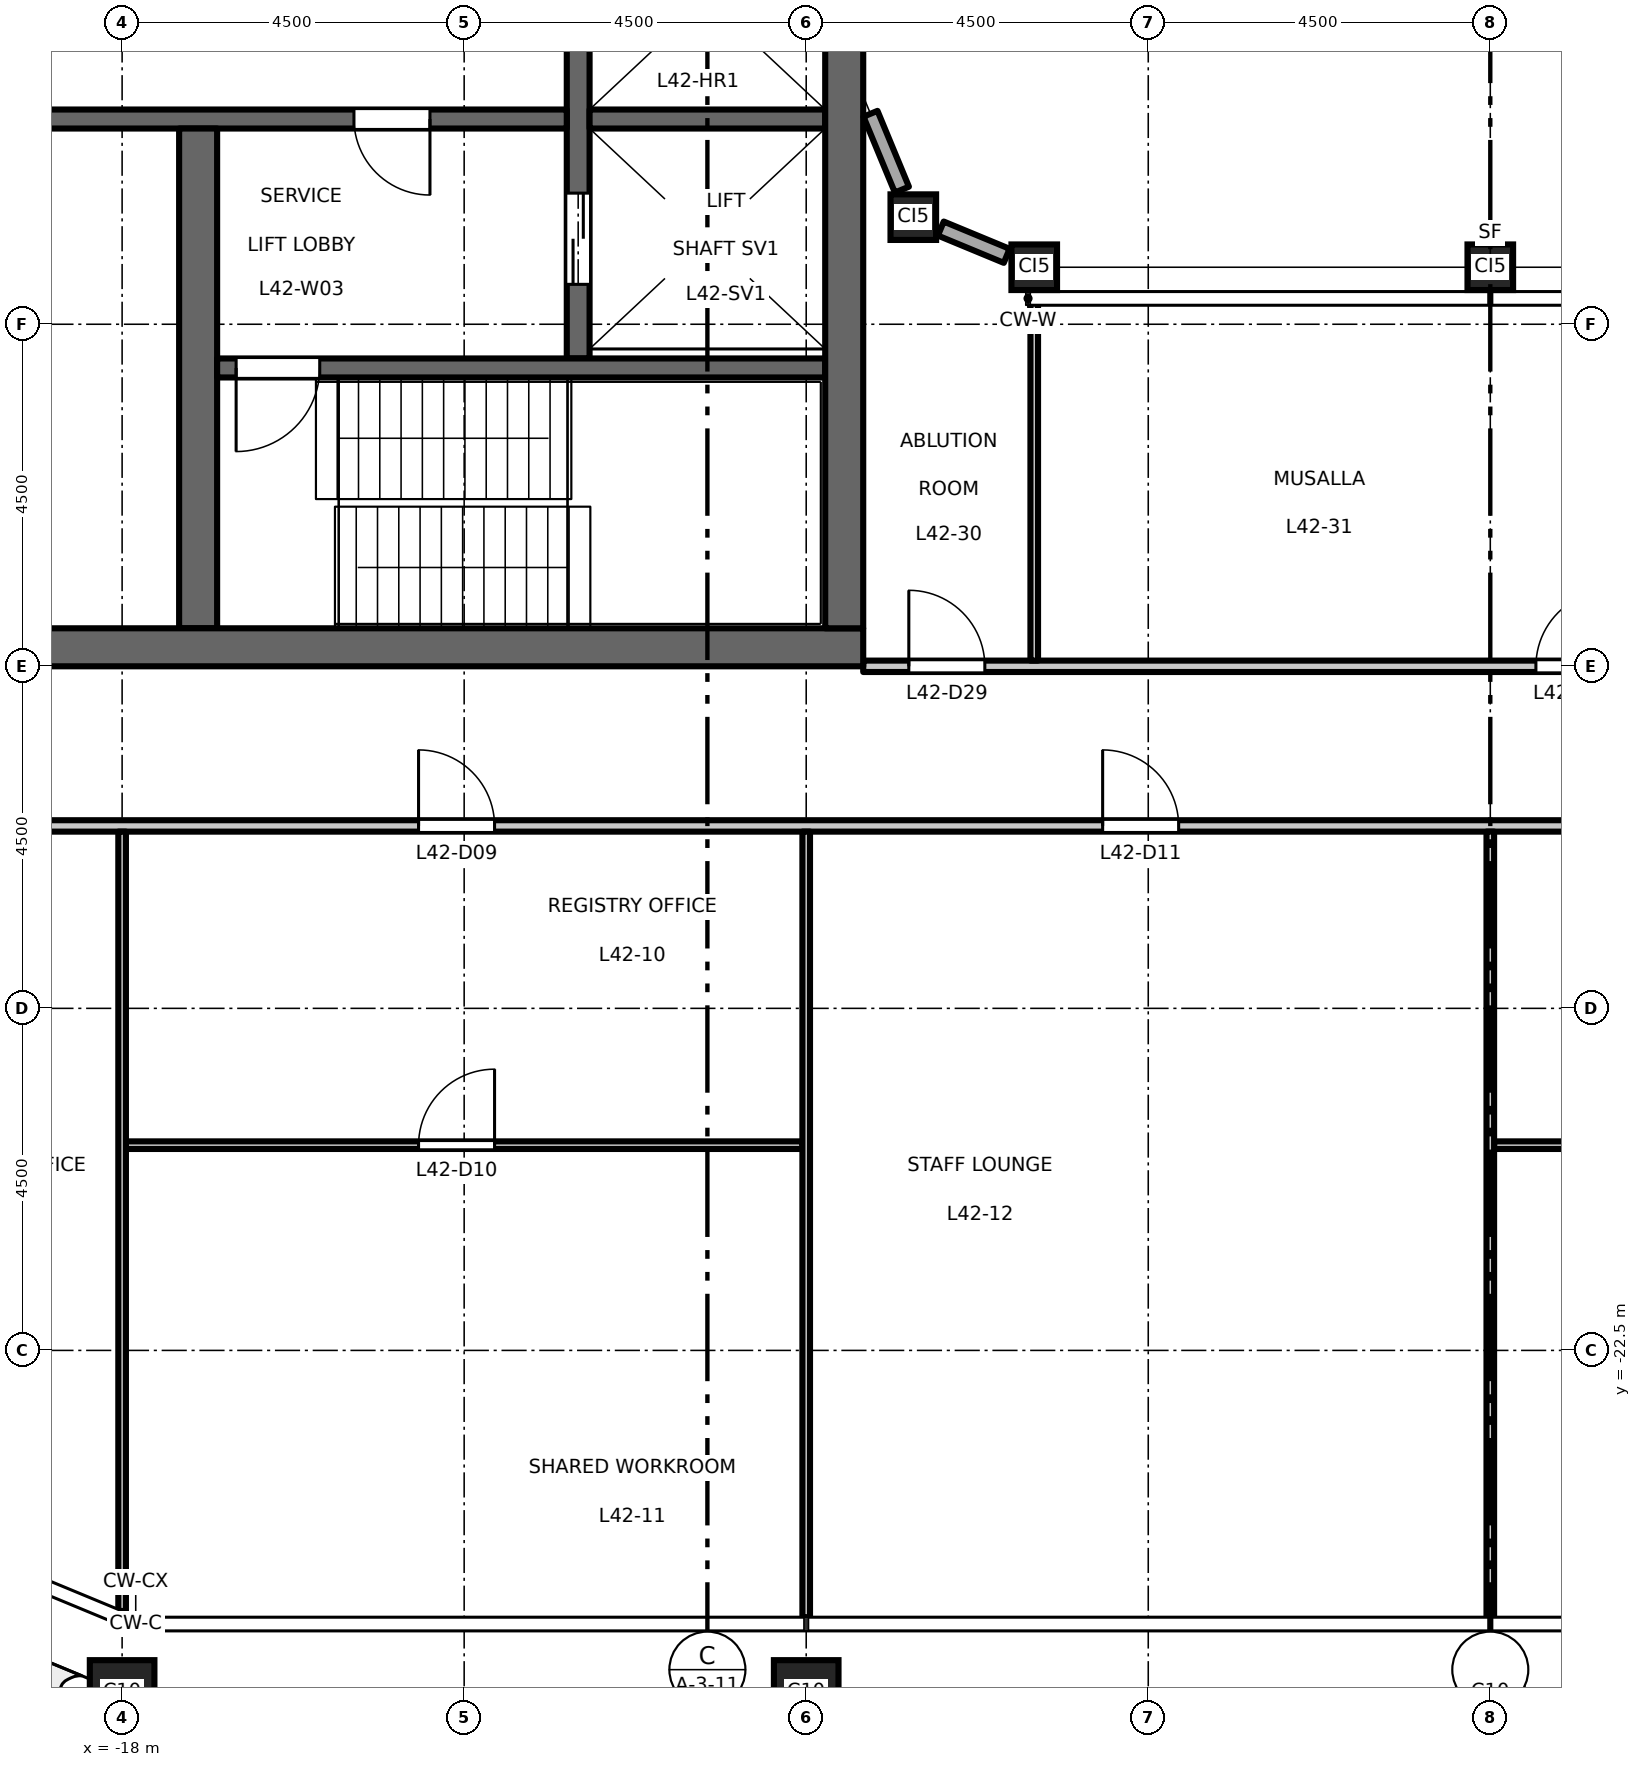
"""IFC4 building model, lengths in metres.
Left out: names, types, materials, properties, quantities, classifications, styles, units other than length and angle.
Written with IfcOpenShell. Run it as: python <this file> out.ifc"""

import sys

from ifc_helpers import new_model, si_unit, direction, frame, frame_2d, origin, origin_2d, place, context, subcontext, project, spatial, rectangle, hollow_rectangle, extrude, element, fill, save


model = new_model("IFC4")
c1 = context("Model", 3, precision=1e-05, world=origin(), true_north=direction((0.0, 1.0)))
c2 = subcontext(c1, "Body", "Model", "MODEL_VIEW")
j1 = project(units=[si_unit("LENGTHUNIT", "METRE"), si_unit("PLANEANGLEUNIT", "RADIAN")], contexts=[c1])
p1 = place(None, origin())
s1 = spatial("IfcSite", under=j1, at=p1, CompositionType="ELEMENT")
p2 = place(p1, origin())
s2 = spatial("IfcBuilding", under=s1, at=p2, CompositionType="ELEMENT")
p3 = place(p2, frame((0.0, 0.0, 197.2)))
s3 = spatial("IfcBuildingStorey", under=s2, at=p3, CompositionType="ELEMENT", Elevation=197.2)
for number, where, z_axis, x_axis in (
    (1, (-18.0, -27.0, 0.0), (0.0, 0.0, 1.0), (1.0, 0.0, 0.0)),
    (2, (-9.0, -27.0, 0.0), (0.0, 0.0, 1.0), (1.0, 0.0, 0.0)),
    (3, (0.0, -27.0, 0.0), (0.0, 0.0, 1.0), (1.0, 0.0, 0.0)),
):
    element("IfcColumn", number, at=place(p3, frame(where, z_axis=z_axis, x_axis=x_axis)), inside=s3, PredefinedType="COLUMN", context=c2, shape_type="SweptSolid", body=[
        extrude(hollow_rectangle(XDim=0.85, YDim=0.85, WallThickness=0.05, at=origin_2d()), origin(), (0.0, 0.0, 1.0), 4.5),
    ])
for number, where, z_axis, x_axis in (
    (4, (-7.591, -7.591, 0.0), (0.0, 0.0, 1.0), (1.0, 0.0, 0.0)),
    (5, (-6.0, -8.25, 0.0), (0.0, 0.0, 1.0), (1.0, 0.0, 0.0)),
    (6, (0.0, -8.25, 0.0), (0.0, 0.0, 1.0), (1.0, 0.0, 0.0)),
):
    element("IfcColumn", number, at=place(p3, frame(where, z_axis=z_axis, x_axis=x_axis)), inside=s3, PredefinedType="COLUMN", context=c2, shape_type="SweptSolid", body=[
        extrude(hollow_rectangle(XDim=0.6, YDim=0.6, WallThickness=0.032, at=origin_2d()), origin(), (0.0, 0.0, 1.0), 4.5),
    ])
p4 = place(p3, frame((-12.0, -9.45, 0.0), z_axis=(0.0, 0.0, 1.0), x_axis=(0.0, 1.0, 0.0)))
e7 = element("IfcWall", 7, at=p4, inside=s3, PredefinedType="SHEAR", context=c2, shape_type="SweptSolid", body=[
    extrude(rectangle(XDim=18.9, YDim=0.3, at=frame_2d((9.45, 0.0))), origin(), (0.0, 0.0, 1.0), 4.35),
])
p5 = place(p4, frame((4.725, 0.0, 0.0)))
e8 = element("IfcOpeningElement", 8, at=p5, cuts=e7, PredefinedType="OPENING", context=c2, shape_type="SweptSolid", body=[
    extrude(rectangle(XDim=1.1, YDim=2.1, at=frame_2d((0.55, 1.05))), frame((0.0, 0.16, 0.0), z_axis=(0.0, -1.0, 0.0), x_axis=(1.0, 0.0, 0.0)), (0.0, 0.0, 1.0), 0.32),
])
p6 = place(p4, frame((7.875, 0.0, 0.0)))
e9 = element("IfcOpeningElement", 9, at=p6, cuts=e7, PredefinedType="OPENING", context=c2, shape_type="SweptSolid", body=[
    extrude(rectangle(XDim=1.1, YDim=2.1, at=frame_2d((0.55, 1.05))), frame((0.0, 0.16, 0.0), z_axis=(0.0, -1.0, 0.0), x_axis=(1.0, 0.0, 0.0)), (0.0, 0.0, 1.0), 0.32),
])
p7 = place(p4, frame((11.025, 0.0, 0.0)))
e10 = element("IfcOpeningElement", 10, at=p7, cuts=e7, PredefinedType="OPENING", context=c2, shape_type="SweptSolid", body=[
    extrude(rectangle(XDim=1.1, YDim=2.1, at=frame_2d((0.55, 1.05))), frame((0.0, 0.16, 0.0), z_axis=(0.0, -1.0, 0.0), x_axis=(1.0, 0.0, 0.0)), (0.0, 0.0, 1.0), 0.32),
])
p8 = place(p4, frame((14.175, 0.0, 0.0)))
e11 = element("IfcOpeningElement", 11, at=p8, cuts=e7, PredefinedType="OPENING", context=c2, shape_type="SweptSolid", body=[
    extrude(rectangle(XDim=1.1, YDim=2.1, at=frame_2d((0.55, 1.05))), frame((0.0, 0.16, 0.0), z_axis=(0.0, -1.0, 0.0), x_axis=(1.0, 0.0, 0.0)), (0.0, 0.0, 1.0), 0.32),
])
p9 = place(p4, frame((16.725, 0.0, 0.0)))
e12 = element("IfcOpeningElement", 12, at=p9, cuts=e7, PredefinedType="OPENING", context=c2, shape_type="SweptSolid", body=[
    extrude(rectangle(XDim=1.2, YDim=2.1, at=frame_2d((0.6, 1.05))), frame((0.0, 0.16, 0.0), z_axis=(0.0, -1.0, 0.0), x_axis=(1.0, 0.0, 0.0)), (0.0, 0.0, 1.0), 0.32),
])
p10 = place(p4, frame((0.975, 0.0, 0.0)))
e13 = element("IfcOpeningElement", 13, at=p10, cuts=e7, PredefinedType="OPENING", context=c2, shape_type="SweptSolid", body=[
    extrude(rectangle(XDim=1.2, YDim=2.1, at=frame_2d((0.6, 1.05))), frame((0.0, 0.16, 0.0), z_axis=(0.0, -1.0, 0.0), x_axis=(1.0, 0.0, 0.0)), (0.0, 0.0, 1.0), 0.32),
])
p11 = place(p3, frame((-12.15, -6.3, 0.0), z_axis=(0.0, 0.0, 1.0), x_axis=(-1.0, 0.0, 0.0)))
e14 = element("IfcWall", 14, at=p11, inside=s3, PredefinedType="SHEAR", context=c2, shape_type="SweptSolid", body=[
    extrude(rectangle(XDim=9.1, YDim=0.25, at=frame_2d((4.55, 0.0))), origin(), (0.0, 0.0, 1.0), 4.35),
])
p12 = place(p11, frame((1.8, 0.0, 0.0)))
e15 = element("IfcOpeningElement", 15, at=p12, cuts=e14, PredefinedType="OPENING", context=c2, shape_type="SweptSolid", body=[
    extrude(rectangle(XDim=1.0, YDim=2.1, at=frame_2d((0.5, 1.05))), frame((0.0, 0.135, 0.0), z_axis=(0.0, -1.0, 0.0), x_axis=(1.0, 0.0, 0.0)), (0.0, 0.0, 1.0), 0.27),
])
p13 = place(p3, frame((-17.0, -13.0, 0.0), z_axis=(0.0, 0.0, 1.0), x_axis=(0.0, 1.0, 0.0)))
e16 = element("IfcWall", 16, at=p13, inside=s3, PredefinedType="SHEAR", context=c2, shape_type="SweptSolid", body=[
    extrude(rectangle(XDim=6.575, YDim=0.5, at=frame_2d((3.288, 0.0))), origin(), (0.0, 0.0, 1.0), 4.35),
])
p14 = place(p3, frame((-8.75, -6.3, 0.0), z_axis=(0.0, 0.0, 1.0), x_axis=(-1.0, 0.0, 0.0)))
e17 = element("IfcWall", 17, at=p14, inside=s3, PredefinedType="SHEAR", context=c2, shape_type="SweptSolid", body=[
    extrude(rectangle(XDim=3.1, YDim=0.25, at=frame_2d((1.55, 0.0))), origin(), (0.0, 0.0, 1.0), 4.35),
])
p15 = place(p3, frame((-8.75, -9.575, 0.0), z_axis=(0.0, 0.0, 1.0), x_axis=(-1.0, 0.0, 0.0)))
e18 = element("IfcWall", 18, at=p15, inside=s3, PredefinedType="SHEAR", context=c2, shape_type="SweptSolid", body=[
    extrude(rectangle(XDim=8.0, YDim=0.25, at=frame_2d((4.0, 0.0))), origin(), (0.0, 0.0, 1.0), 4.35),
])
p16 = place(p15, frame((6.65, 0.0, 0.0)))
e19 = element("IfcOpeningElement", 19, at=p16, cuts=e18, PredefinedType="OPENING", context=c2, shape_type="SweptSolid", body=[
    extrude(rectangle(XDim=1.1, YDim=2.1, at=frame_2d((0.55, 1.05))), frame((0.0, 0.135, 0.0), z_axis=(0.0, -1.0, 0.0), x_axis=(1.0, 0.0, 0.0)), (0.0, 0.0, 1.0), 0.27),
])
p17 = place(p3, frame((-8.25, -13.25, 0.0), z_axis=(0.0, 0.0, 1.0), x_axis=(-1.0, 0.0, 0.0)))
e20 = element("IfcWall", 20, at=p17, inside=s3, PredefinedType="SHEAR", context=c2, shape_type="SweptSolid", body=[
    extrude(rectangle(XDim=13.5, YDim=0.5, at=frame_2d((6.75, 0.0))), origin(), (0.0, 0.0, 1.0), 4.35),
])
p18 = place(p3, frame((-8.5, -13.0, 0.0), z_axis=(0.0, 0.0, 1.0), x_axis=(0.0, 1.0, 0.0)))
e21 = element("IfcWall", 21, at=p18, inside=s3, PredefinedType="SHEAR", context=c2, shape_type="SweptSolid", body=[
    extrude(rectangle(XDim=26.0, YDim=0.5, at=frame_2d((13.0, 0.0))), origin(), (0.0, 0.0, 1.0), 4.35),
])
p19 = place(p3, frame((-8.154, -6.231, 0.0), z_axis=(0.0, 0.0, 1.0), x_axis=(0.382704496366, -0.923870807235, 0.0)))
e22 = element("IfcWall", 22, at=p19, inside=s3, PredefinedType="STANDARD", context=c2, shape_type="SweptSolid", body=[
    extrude(rectangle(XDim=1.08, YDim=0.2, at=frame_2d((0.54, 0.0))), origin(), (0.0, 0.0, 1.0), 3.918),
])
p20 = place(p3, frame((-7.229, -7.741, 0.0), z_axis=(0.0, 0.0, 1.0), x_axis=(0.923829670615, -0.382803787458, 0.0)))
e23 = element("IfcWall", 23, at=p20, inside=s3, PredefinedType="STANDARD", context=c2, shape_type="SweptSolid", body=[
    extrude(rectangle(XDim=0.938, YDim=0.2, at=frame_2d((0.469, 0.0))), origin(), (0.0, 0.0, 1.0), 3.918),
])
p21 = place(p3, frame((-17.95, -19.8, 0.0), z_axis=(0.0, 0.0, 1.0), x_axis=(1.0, 0.0, 0.0)))
e24 = element("IfcWall", 24, at=p21, inside=s3, PredefinedType="PARTITIONING", context=c2, shape_type="SweptSolid", body=[
    extrude(rectangle(XDim=8.9, YDim=0.1, at=frame_2d((4.45, 0.0))), origin(), (0.0, 0.0, 1.0), 4.35),
])
p22 = place(p21, frame((3.85, 0.0, 0.0)))
e25 = element("IfcOpeningElement", 25, at=p22, cuts=e24, PredefinedType="OPENING", context=c2, shape_type="SweptSolid", body=[
    extrude(rectangle(XDim=1.0, YDim=2.1, at=frame_2d((0.5, 1.05))), frame((0.0, 0.06, 0.0), z_axis=(0.0, -1.0, 0.0), x_axis=(1.0, 0.0, 0.0)), (0.0, 0.0, 1.0), 0.12),
])
p23 = place(p3, frame((0.05, -19.8, 0.0), z_axis=(0.0, 0.0, 1.0), x_axis=(1.0, 0.0, 0.0)))
e26 = element("IfcWall", 26, at=p23, inside=s3, PredefinedType="PARTITIONING", context=c2, shape_type="SweptSolid", body=[
    extrude(rectangle(XDim=17.9, YDim=0.1, at=frame_2d((8.95, 0.0))), origin(), (0.0, 0.0, 1.0), 4.35),
])
p24 = place(p23, frame((3.85, 0.0, 0.0)))
e27 = element("IfcOpeningElement", 27, at=p24, cuts=e26, PredefinedType="OPENING", context=c2, shape_type="SweptSolid", body=[
    extrude(rectangle(XDim=1.0, YDim=2.1, at=frame_2d((0.5, 1.05))), frame((0.0, 0.06, 0.0), z_axis=(0.0, -1.0, 0.0), x_axis=(1.0, 0.0, 0.0)), (0.0, 0.0, 1.0), 0.12),
])
p25 = place(p23, frame((12.85, 0.0, 0.0)))
e28 = element("IfcOpeningElement", 28, at=p25, cuts=e26, PredefinedType="OPENING", context=c2, shape_type="SweptSolid", body=[
    extrude(rectangle(XDim=1.0, YDim=2.1, at=frame_2d((0.5, 1.05))), frame((0.0, 0.06, 0.0), z_axis=(0.0, -1.0, 0.0), x_axis=(1.0, 0.0, 0.0)), (0.0, 0.0, 1.0), 0.12),
])
p26 = place(p3, frame((-26.01, -15.6, 0.0), z_axis=(0.0, 0.0, 1.0), x_axis=(1.0, 0.0, 0.0)))
e29 = element("IfcWall", 29, at=p26, inside=s3, PredefinedType="PARTITIONING", context=c2, shape_type="SweptSolid", body=[
    extrude(rectangle(XDim=52.02, YDim=0.15, at=frame_2d((26.01, 0.0))), origin(), (0.0, 0.0, 1.0), 4.35),
])
p27 = place(p26, frame((11.91, 0.0, 0.0)))
e30 = element("IfcOpeningElement", 30, at=p27, cuts=e29, PredefinedType="OPENING", context=c2, shape_type="SweptSolid", body=[
    extrude(rectangle(XDim=1.0, YDim=2.1, at=frame_2d((0.5, 1.05))), frame((0.0, 0.085, 0.0), z_axis=(0.0, -1.0, 0.0), x_axis=(1.0, 0.0, 0.0)), (0.0, 0.0, 1.0), 0.17),
])
p28 = place(p26, frame((20.91, 0.0, 0.0)))
e31 = element("IfcOpeningElement", 31, at=p28, cuts=e29, PredefinedType="OPENING", context=c2, shape_type="SweptSolid", body=[
    extrude(rectangle(XDim=1.0, YDim=2.1, at=frame_2d((0.5, 1.05))), frame((0.0, 0.085, 0.0), z_axis=(0.0, -1.0, 0.0), x_axis=(1.0, 0.0, 0.0)), (0.0, 0.0, 1.0), 0.17),
])
p29 = place(p26, frame((29.91, 0.0, 0.0)))
e32 = element("IfcOpeningElement", 32, at=p29, cuts=e29, PredefinedType="OPENING", context=c2, shape_type="SweptSolid", body=[
    extrude(rectangle(XDim=1.0, YDim=2.1, at=frame_2d((0.5, 1.05))), frame((0.0, 0.085, 0.0), z_axis=(0.0, -1.0, 0.0), x_axis=(1.0, 0.0, 0.0)), (0.0, 0.0, 1.0), 0.17),
])
p30 = place(p26, frame((38.91, 0.0, 0.0)))
e33 = element("IfcOpeningElement", 33, at=p30, cuts=e29, PredefinedType="OPENING", context=c2, shape_type="SweptSolid", body=[
    extrude(rectangle(XDim=1.0, YDim=2.1, at=frame_2d((0.5, 1.05))), frame((0.0, 0.085, 0.0), z_axis=(0.0, -1.0, 0.0), x_axis=(1.0, 0.0, 0.0)), (0.0, 0.0, 1.0), 0.17),
])
p31 = place(p26, frame((3.4, 0.0, 0.0)))
e34 = element("IfcOpeningElement", 34, at=p31, cuts=e29, PredefinedType="OPENING", context=c2, shape_type="SweptSolid", body=[
    extrude(rectangle(XDim=1.0, YDim=2.1, at=frame_2d((0.5, 1.05))), frame((0.0, 0.085, 0.0), z_axis=(0.0, -1.0, 0.0), x_axis=(1.0, 0.0, 0.0)), (0.0, 0.0, 1.0), 0.17),
])
p32 = place(p26, frame((47.41, 0.0, 0.0)))
e35 = element("IfcOpeningElement", 35, at=p32, cuts=e29, PredefinedType="OPENING", context=c2, shape_type="SweptSolid", body=[
    extrude(rectangle(XDim=1.0, YDim=2.1, at=frame_2d((0.5, 1.05))), frame((0.0, 0.085, 0.0), z_axis=(0.0, -1.0, 0.0), x_axis=(1.0, 0.0, 0.0)), (0.0, 0.0, 1.0), 0.17),
])
p33 = place(p3, frame((-8.25, -13.5, 0.0), z_axis=(0.0, 0.0, 1.0), x_axis=(1.0, 0.0, 0.0)))
e36 = element("IfcWall", 36, at=p33, inside=s3, PredefinedType="PARTITIONING", context=c2, shape_type="SweptSolid", body=[
    extrude(rectangle(XDim=16.5, YDim=0.15, at=frame_2d((8.25, 0.0))), origin(), (0.0, 0.0, 1.0), 3.95),
])
p34 = place(p33, frame((0.6, 0.0, 0.0)))
e37 = element("IfcOpeningElement", 37, at=p34, cuts=e36, PredefinedType="OPENING", context=c2, shape_type="SweptSolid", body=[
    extrude(rectangle(XDim=1.0, YDim=2.1, at=frame_2d((0.5, 1.05))), frame((0.0, 0.085, 0.0), z_axis=(0.0, -1.0, 0.0), x_axis=(1.0, 0.0, 0.0)), (0.0, 0.0, 1.0), 0.17),
])
p35 = place(p33, frame((8.85, 0.0, 0.0)))
e38 = element("IfcOpeningElement", 38, at=p35, cuts=e36, PredefinedType="OPENING", context=c2, shape_type="SweptSolid", body=[
    extrude(rectangle(XDim=1.0, YDim=2.1, at=frame_2d((0.5, 1.05))), frame((0.0, 0.085, 0.0), z_axis=(0.0, -1.0, 0.0), x_axis=(1.0, 0.0, 0.0)), (0.0, 0.0, 1.0), 0.17),
])
p36 = place(p3, frame((-18.0, -25.928, 0.0), z_axis=(0.0, 0.0, 1.0), x_axis=(0.0, 1.0, 0.0)))
e39 = element("IfcWall", 39, at=p36, inside=s3, PredefinedType="PARTITIONING", context=c2, shape_type="SweptSolid", body=[
    extrude(rectangle(XDim=10.253, YDim=0.1, at=frame_2d((5.126, 0.0))), origin(), (0.0, 0.0, 1.0), 3.65),
])
p37 = place(p3, frame((-9.0, -26.01, 0.0), z_axis=(0.0, 0.0, 1.0), x_axis=(0.0, 1.0, 0.0)))
e40 = element("IfcWall", 40, at=p37, inside=s3, PredefinedType="PARTITIONING", context=c2, shape_type="SweptSolid", body=[
    extrude(rectangle(XDim=10.335, YDim=0.1, at=frame_2d((5.167, 0.0))), origin(), (0.0, 0.0, 1.0), 3.65),
])
p38 = place(p3, frame((-6.0, -13.425, 0.0), z_axis=(0.0, 0.0, 1.0), x_axis=(0.0, 1.0, 0.0)))
e41 = element("IfcWall", 41, at=p38, inside=s3, PredefinedType="PARTITIONING", context=c2, shape_type="SweptSolid", body=[
    extrude(rectangle(XDim=4.825, YDim=0.1, at=frame_2d((2.413, 0.0))), origin(), (0.0, 0.0, 1.0), 4.35),
])
p39 = place(p3, frame((0.0, -26.01, 0.0), z_axis=(0.0, 0.0, 1.0), x_axis=(0.0, 1.0, 0.0)))
e42 = element("IfcWall", 42, at=p39, inside=s3, PredefinedType="PARTITIONING", context=c2, shape_type="SweptSolid", body=[
    extrude(rectangle(XDim=10.335, YDim=0.1, at=frame_2d((5.167, 0.0))), origin(), (0.0, 0.0, 1.0), 3.55),
])
p40 = place(p12, origin())
e43 = element("IfcDoor", 43, at=p40, inside=s3, OperationType="SINGLE_SWING_RIGHT", PredefinedType="DOOR", context=c2, shape_type="SweptSolid", body=[
    extrude(rectangle(XDim=1.0, YDim=2.1, at=frame_2d((0.5, 1.05))), frame((0.0, 0.025, 0.0), z_axis=(0.0, -1.0, 0.0), x_axis=(1.0, 0.0, 0.0)), (0.0, 0.0, 1.0), 0.05),
])
fill(e15, e43)
p41 = place(p16, origin())
e44 = element("IfcDoor", 44, at=p41, inside=s3, OperationType="SINGLE_SWING_LEFT", PredefinedType="DOOR", context=c2, shape_type="SweptSolid", body=[
    extrude(rectangle(XDim=1.1, YDim=2.1, at=frame_2d((0.55, 1.05))), frame((0.0, 0.025, 0.0), z_axis=(0.0, -1.0, 0.0), x_axis=(1.0, 0.0, 0.0)), (0.0, 0.0, 1.0), 0.05),
])
fill(e19, e44)
p42 = place(p10, origin())
e45 = element("IfcDoor", 45, at=p42, inside=s3, OperationType="DOUBLE_DOOR_SLIDING", PredefinedType="DOOR", context=c2, shape_type="SweptSolid", body=[
    extrude(rectangle(XDim=1.2, YDim=2.1, at=frame_2d((0.6, 1.05))), frame((0.0, 0.025, 0.0), z_axis=(0.0, -1.0, 0.0), x_axis=(1.0, 0.0, 0.0)), (0.0, 0.0, 1.0), 0.05),
])
fill(e13, e45)
p43 = place(p27, origin())
e46 = element("IfcDoor", 46, at=p43, inside=s3, OperationType="SINGLE_SWING_LEFT", PredefinedType="DOOR", context=c2, shape_type="SweptSolid", body=[
    extrude(rectangle(XDim=1.0, YDim=2.1, at=frame_2d((0.5, 1.05))), frame((0.0, 0.025, 0.0), z_axis=(0.0, -1.0, 0.0), x_axis=(1.0, 0.0, 0.0)), (0.0, 0.0, 1.0), 0.05),
])
fill(e30, e46)
p44 = place(p22, origin())
e47 = element("IfcDoor", 47, at=p44, inside=s3, OperationType="SINGLE_SWING_RIGHT", PredefinedType="DOOR", context=c2, shape_type="SweptSolid", body=[
    extrude(rectangle(XDim=1.0, YDim=2.1, at=frame_2d((0.5, 1.05))), frame((0.0, 0.025, 0.0), z_axis=(0.0, -1.0, 0.0), x_axis=(1.0, 0.0, 0.0)), (0.0, 0.0, 1.0), 0.05),
])
fill(e25, e47)
p45 = place(p28, origin())
e48 = element("IfcDoor", 48, at=p45, inside=s3, OperationType="SINGLE_SWING_LEFT", PredefinedType="DOOR", context=c2, shape_type="SweptSolid", body=[
    extrude(rectangle(XDim=1.0, YDim=2.1, at=frame_2d((0.5, 1.05))), frame((0.0, 0.025, 0.0), z_axis=(0.0, -1.0, 0.0), x_axis=(1.0, 0.0, 0.0)), (0.0, 0.0, 1.0), 0.05),
])
fill(e31, e48)
p46 = place(p34, origin())
e49 = element("IfcDoor", 49, at=p46, inside=s3, OperationType="SINGLE_SWING_LEFT", PredefinedType="DOOR", context=c2, shape_type="SweptSolid", body=[
    extrude(rectangle(XDim=1.0, YDim=2.1, at=frame_2d((0.5, 1.05))), frame((0.0, 0.025, 0.0), z_axis=(0.0, -1.0, 0.0), x_axis=(1.0, 0.0, 0.0)), (0.0, 0.0, 1.0), 0.05),
])
fill(e37, e49)
p47 = place(p35, origin())
e50 = element("IfcDoor", 50, at=p47, inside=s3, OperationType="SINGLE_SWING_RIGHT", PredefinedType="DOOR", context=c2, shape_type="SweptSolid", body=[
    extrude(rectangle(XDim=1.0, YDim=2.1, at=frame_2d((0.5, 1.05))), frame((0.0, 0.025, 0.0), z_axis=(0.0, -1.0, 0.0), x_axis=(1.0, 0.0, 0.0)), (0.0, 0.0, 1.0), 0.05),
])
fill(e38, e50)
save(model, sys.argv[1])
